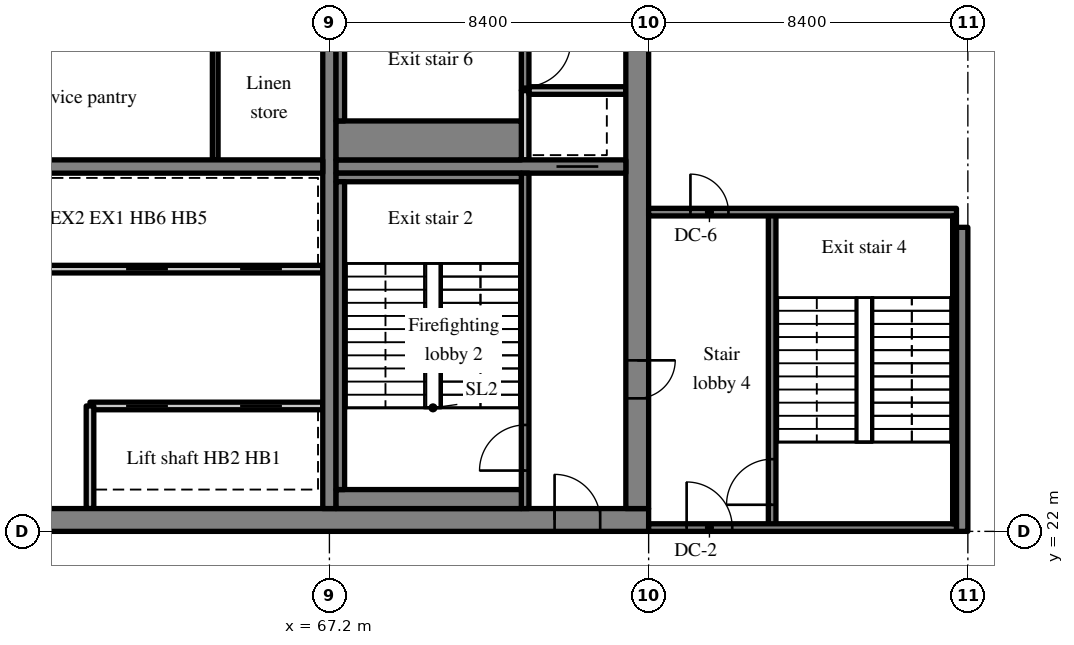
"""IFC4 building model, lengths in metres.
Left out: names, types, materials, properties, quantities, classifications, styles, units other than length and angle.
Written with IfcOpenShell. Run it as: python <this file> out.ifc"""

import sys

from ifc_helpers import new_model, si_unit, direction, frame, frame_2d, origin, place, context, subcontext, project, spatial, rectangle, extrude, source, transform, mapped, element, fill, save


model = new_model("IFC4")
c1 = context("Model", 3, precision=1e-05, world=origin(), true_north=direction((0.0, 1.0)))
c2 = subcontext(c1, "Body", "Model", "MODEL_VIEW")
j1 = project(units=[si_unit("LENGTHUNIT", "METRE"), si_unit("PLANEANGLEUNIT", "RADIAN")], contexts=[c1])
p1 = place(None, origin())
s1 = spatial("IfcSite", under=j1, at=p1, CompositionType="ELEMENT")
p2 = place(p1, origin())
s2 = spatial("IfcBuilding", under=s1, at=p2, CompositionType="ELEMENT")
p3 = place(p2, frame((0.0, 0.0, 221.8)))
s3 = spatial("IfcBuildingStorey", under=s2, at=p3, CompositionType="ELEMENT", Elevation=221.8)
m1 = source(origin(), c2, "Body", "SweptSolid", [
    extrude(rectangle(XDim=50.4, YDim=0.6, at=frame_2d((25.2, 0.0))), origin(), (0.0, 0.0, 1.0), 3.62),
])
p4 = place(p3, frame((25.2, 22.3, 0.0), z_axis=(0.0, 0.0, 1.0), x_axis=(1.0, 0.0, 0.0)))
e1 = element("IfcWall", 1, at=p4, inside=s3, PredefinedType="SHEAR", context=c2, shape_type="MappedRepresentation", body=[
    mapped(m1, transform((0.0, 0.0, 0.0), scale=1.0)),
])
m2 = source(origin(), c2, "Body", "SweptSolid", [
    extrude(rectangle(XDim=1.8, YDim=2.1, at=frame_2d((0.9, 1.05))), frame((0.0, 0.31, 0.0), z_axis=(0.0, -1.0, 0.0), x_axis=(1.0, 0.0, 0.0)), (0.0, 0.0, 1.0), 0.62),
])
p5 = place(p4, frame((15.9, 0.0, 0.0)))
e2 = element("IfcOpeningElement", 2, at=p5, cuts=e1, PredefinedType="OPENING", context=c2, shape_type="MappedRepresentation", body=[
    mapped(m2, transform((0.0, 0.0, 0.0), scale=1.0)),
])
m3 = source(origin(), c2, "Body", "SweptSolid", [
    extrude(rectangle(XDim=0.9, YDim=2.1, at=frame_2d((0.45, 1.05))), frame((0.0, 0.31, 0.0), z_axis=(0.0, -1.0, 0.0), x_axis=(1.0, 0.0, 0.0)), (0.0, 0.0, 1.0), 0.62),
])
p6 = place(p4, frame((9.687, 0.0, 0.0)))
e3 = element("IfcOpeningElement", 3, at=p6, cuts=e1, PredefinedType="OPENING", context=c2, shape_type="MappedRepresentation", body=[
    mapped(m3, transform((0.0, 0.0, 0.0), scale=1.0)),
])
p7 = place(p4, frame((21.513, 0.0, 0.0)))
e4 = element("IfcOpeningElement", 4, at=p7, cuts=e1, PredefinedType="OPENING", context=c2, shape_type="MappedRepresentation", body=[
    mapped(m3, transform((0.0, 0.0, 0.0), scale=1.0)),
])
p8 = place(p4, frame((32.7, 0.0, 0.0)))
e5 = element("IfcOpeningElement", 5, at=p8, cuts=e1, PredefinedType="OPENING", context=c2, shape_type="MappedRepresentation", body=[
    mapped(m2, transform((0.0, 0.0, 0.0), scale=1.0)),
])
m4 = source(origin(), c2, "Body", "SweptSolid", [
    extrude(rectangle(XDim=1.2, YDim=2.1, at=frame_2d((0.6, 1.05))), frame((0.0, 0.31, 0.0), z_axis=(0.0, -1.0, 0.0), x_axis=(1.0, 0.0, 0.0)), (0.0, 0.0, 1.0), 0.62),
])
p9 = place(p4, frame((6.488, 0.0, 0.0)))
e6 = element("IfcOpeningElement", 6, at=p9, cuts=e1, PredefinedType="OPENING", context=c2, shape_type="MappedRepresentation", body=[
    mapped(m4, transform((0.0, 0.0, 0.0), scale=1.0)),
])
p10 = place(p4, frame((47.925, 0.0, 0.0)))
e7 = element("IfcOpeningElement", 7, at=p10, cuts=e1, PredefinedType="OPENING", context=c2, shape_type="MappedRepresentation", body=[
    mapped(m4, transform((0.0, 0.0, 0.0), scale=1.0)),
])
m5 = source(origin(), c2, "Body", "SweptSolid", [
    extrude(rectangle(XDim=18.8, YDim=0.6, at=frame_2d((9.4, 0.0))), origin(), (0.0, 0.0, 1.0), 3.62),
])
p11 = place(p3, frame((75.3, 22.6, 0.0), z_axis=(0.0, 0.0, 1.0), x_axis=(0.0, 1.0, 0.0)))
e8 = element("IfcWall", 8, at=p11, inside=s3, PredefinedType="SHEAR", context=c2, shape_type="MappedRepresentation", body=[
    mapped(m5, transform((0.0, 0.0, 0.0), scale=1.0)),
])
m6 = source(origin(), c2, "Body", "SweptSolid", [
    extrude(rectangle(XDim=1.0, YDim=2.1, at=frame_2d((0.5, 1.05))), frame((0.0, 0.31, 0.0), z_axis=(0.0, -1.0, 0.0), x_axis=(1.0, 0.0, 0.0)), (0.0, 0.0, 1.0), 0.62),
])
p12 = place(p11, frame((2.9, 0.0, 0.0)))
e9 = element("IfcOpeningElement", 9, at=p12, cuts=e8, PredefinedType="OPENING", context=c2, shape_type="MappedRepresentation", body=[
    mapped(m6, transform((0.0, 0.0, 0.0), scale=1.0)),
])
p13 = place(p11, frame((12.8, 0.0, 0.0)))
e10 = element("IfcOpeningElement", 10, at=p13, cuts=e8, PredefinedType="OPENING", context=c2, shape_type="MappedRepresentation", body=[
    mapped(m4, transform((0.0, 0.0, 0.0), scale=1.0)),
])
m7 = source(origin(), c2, "Body", "SweptSolid", [
    extrude(rectangle(XDim=18.8, YDim=0.35, at=frame_2d((9.4, 0.0))), origin(), (0.0, 0.0, 1.0), 3.62),
])
p14 = place(p3, frame((67.2, 22.6, 0.0), z_axis=(0.0, 0.0, 1.0), x_axis=(0.0, 1.0, 0.0)))
e11 = element("IfcWall", 11, at=p14, inside=s3, PredefinedType="SHEAR", context=c2, shape_type="MappedRepresentation", body=[
    mapped(m7, transform((0.0, 0.0, 0.0), scale=1.0)),
])
m8 = source(origin(), c2, "Body", "SweptSolid", [
    extrude(rectangle(XDim=16.45, YDim=0.35, at=frame_2d((8.225, 0.0))), origin(), (0.0, 0.0, 1.0), 3.62),
])
p15 = place(p3, frame((50.575, 31.6, 0.0), z_axis=(0.0, 0.0, 1.0), x_axis=(1.0, 0.0, 0.0)))
e12 = element("IfcWall", 12, at=p15, inside=s3, PredefinedType="SHEAR", context=c2, shape_type="MappedRepresentation", body=[
    mapped(m8, transform((0.0, 0.0, 0.0), scale=1.0)),
])
m9 = source(origin(), c2, "Body", "SweptSolid", [
    extrude(rectangle(XDim=1.0, YDim=2.1, at=frame_2d((0.5, 1.05))), frame((0.0, 0.185, 0.0), z_axis=(0.0, -1.0, 0.0), x_axis=(1.0, 0.0, 0.0)), (0.0, 0.0, 1.0), 0.37),
])
p16 = place(p15, frame((0.613, 0.0, 0.0)))
e13 = element("IfcOpeningElement", 13, at=p16, cuts=e12, PredefinedType="OPENING", context=c2, shape_type="MappedRepresentation", body=[
    mapped(m9, transform((0.0, 0.0, 0.0), scale=1.0)),
])
m10 = source(origin(), c2, "Body", "SweptSolid", [
    extrude(rectangle(XDim=7.625, YDim=0.35, at=frame_2d((3.812, 0.0))), origin(), (0.0, 0.0, 1.0), 3.62),
])
p17 = place(p3, frame((67.375, 31.6, 0.0), z_axis=(0.0, 0.0, 1.0), x_axis=(1.0, 0.0, 0.0)))
e14 = element("IfcWall", 14, at=p17, inside=s3, PredefinedType="SHEAR", context=c2, shape_type="MappedRepresentation", body=[
    mapped(m10, transform((0.0, 0.0, 0.0), scale=1.0)),
])
m11 = source(origin(), c2, "Body", "SweptSolid", [
    extrude(rectangle(XDim=1.1, YDim=2.1, at=frame_2d((0.55, 1.05))), frame((0.0, 0.185, 0.0), z_axis=(0.0, -1.0, 0.0), x_axis=(1.0, 0.0, 0.0)), (0.0, 0.0, 1.0), 0.37),
])
p18 = place(p17, frame((5.8, 0.0, 0.0)))
e15 = element("IfcOpeningElement", 15, at=p18, cuts=e14, PredefinedType="OPENING", context=c2, shape_type="MappedRepresentation", body=[
    mapped(m11, transform((0.0, 0.0, 0.0), scale=1.0)),
])
m12 = source(origin(), c2, "Body", "SweptSolid", [
    extrude(rectangle(XDim=8.0, YDim=0.3, at=frame_2d((4.0, 0.0))), origin(), (0.0, 0.0, 1.0), 3.62),
])
p19 = place(p3, frame((83.85, 22.0, 0.0), z_axis=(0.0, 0.0, 1.0), x_axis=(0.0, 1.0, 0.0)))
e16 = element("IfcWall", 16, at=p19, inside=s3, PredefinedType="SHEAR", context=c2, shape_type="MappedRepresentation", body=[
    mapped(m12, transform((0.0, 0.0, 0.0), scale=1.0)),
])
m13 = source(origin(), c2, "Body", "SweptSolid", [
    extrude(rectangle(XDim=6.125, YDim=0.2, at=frame_2d((3.062, 0.0))), origin(), (0.0, 0.0, 1.0), 3.62),
])
p20 = place(p3, frame((67.025, 25.3, 0.0), z_axis=(0.0, 0.0, 1.0), x_axis=(-1.0, 0.0, 0.0)))
e17 = element("IfcWall", 17, at=p20, inside=s3, PredefinedType="SOLIDWALL", context=c2, shape_type="MappedRepresentation", body=[
    mapped(m13, transform((0.0, 0.0, 0.0), scale=1.0)),
])
m14 = source(origin(), c2, "Body", "SweptSolid", [
    extrude(rectangle(XDim=1.1, YDim=2.1, at=frame_2d((0.55, 1.05))), frame((0.0, 0.11, 0.0), z_axis=(0.0, -1.0, 0.0), x_axis=(1.0, 0.0, 0.0)), (0.0, 0.0, 1.0), 0.22),
])
p21 = place(p20, frame((1.075, 0.0, 0.0)))
e18 = element("IfcOpeningElement", 18, at=p21, cuts=e17, PredefinedType="OPENING", context=c2, shape_type="MappedRepresentation", body=[
    mapped(m14, transform((0.0, 0.0, 0.0), scale=1.0)),
])
p22 = place(p20, frame((4.075, 0.0, 0.0)))
e19 = element("IfcOpeningElement", 19, at=p22, cuts=e17, PredefinedType="OPENING", context=c2, shape_type="MappedRepresentation", body=[
    mapped(m14, transform((0.0, 0.0, 0.0), scale=1.0)),
])
m15 = source(origin(), c2, "Body", "SweptSolid", [
    extrude(rectangle(XDim=12.125, YDim=0.2, at=frame_2d((6.062, 0.0))), origin(), (0.0, 0.0, 1.0), 3.62),
])
p23 = place(p3, frame((67.025, 28.9, 0.0), z_axis=(0.0, 0.0, 1.0), x_axis=(-1.0, 0.0, 0.0)))
e20 = element("IfcWall", 20, at=p23, inside=s3, PredefinedType="SOLIDWALL", context=c2, shape_type="MappedRepresentation", body=[
    mapped(m15, transform((0.0, 0.0, 0.0), scale=1.0)),
])
p24 = place(p23, frame((1.075, 0.0, 0.0)))
e21 = element("IfcOpeningElement", 21, at=p24, cuts=e20, PredefinedType="OPENING", context=c2, shape_type="MappedRepresentation", body=[
    mapped(m14, transform((0.0, 0.0, 0.0), scale=1.0)),
])
p25 = place(p23, frame((4.075, 0.0, 0.0)))
e22 = element("IfcOpeningElement", 22, at=p25, cuts=e20, PredefinedType="OPENING", context=c2, shape_type="MappedRepresentation", body=[
    mapped(m14, transform((0.0, 0.0, 0.0), scale=1.0)),
])
m16 = source(origin(), c2, "Body", "SweptSolid", [
    extrude(rectangle(XDim=2.7, YDim=0.2, at=frame_2d((1.35, 0.0))), origin(), (0.0, 0.0, 1.0), 3.62),
])
p26 = place(p3, frame((60.9, 22.6, 0.0), z_axis=(0.0, 0.0, 1.0), x_axis=(0.0, 1.0, 0.0)))
e23 = element("IfcWall", 23, at=p26, inside=s3, PredefinedType="SOLIDWALL", context=c2, shape_type="MappedRepresentation", body=[
    mapped(m16, transform((0.0, 0.0, 0.0), scale=1.0)),
])
m17 = source(origin(), c2, "Body", "SweptSolid", [
    extrude(rectangle(XDim=3.225, YDim=0.15, at=frame_2d((1.613, 0.0))), origin(), (0.0, 0.0, 1.0), 3.62),
])
p27 = place(p3, frame((64.195, 31.775, 0.0), z_axis=(0.0, 0.0, 1.0), x_axis=(0.0, 1.0, 0.0)))
e24 = element("IfcWall", 24, at=p27, inside=s3, PredefinedType="PARTITIONING", context=c2, shape_type="MappedRepresentation", body=[
    mapped(m17, transform((0.0, 0.0, 0.0), scale=1.0)),
])
m18 = source(origin(), c2, "Body", "SweptSolid", [
    extrude(rectangle(XDim=8.825, YDim=0.2, at=frame_2d((4.413, 0.0))), origin(), (0.0, 0.0, 1.0), 3.62),
])
p28 = place(p3, frame((72.35, 22.6, 0.0), z_axis=(0.0, 0.0, 1.0), x_axis=(0.0, 1.0, 0.0)))
e25 = element("IfcWall", 25, at=p28, inside=s3, PredefinedType="SOLIDWALL", context=c2, shape_type="MappedRepresentation", body=[
    mapped(m18, transform((0.0, 0.0, 0.0), scale=1.0)),
])
m19 = source(origin(), c2, "Body", "SweptSolid", [
    extrude(rectangle(XDim=1.2, YDim=2.1, at=frame_2d((0.6, 1.05))), frame((0.0, 0.11, 0.0), z_axis=(0.0, -1.0, 0.0), x_axis=(1.0, 0.0, 0.0)), (0.0, 0.0, 1.0), 0.22),
])
p29 = place(p28, frame((1.0, 0.0, 0.0)))
e26 = element("IfcOpeningElement", 26, at=p29, cuts=e25, PredefinedType="OPENING", context=c2, shape_type="MappedRepresentation", body=[
    mapped(m19, transform((0.0, 0.0, 0.0), scale=1.0)),
])
m20 = source(origin(), c2, "Body", "SweptSolid", [
    extrude(rectangle(XDim=1.825, YDim=0.2, at=frame_2d((0.913, 0.0))), origin(), (0.0, 0.0, 1.0), 3.62),
])
p30 = place(p3, frame((72.35, 31.775, 0.0), z_axis=(0.0, 0.0, 1.0), x_axis=(0.0, 1.0, 0.0)))
e27 = element("IfcWall", 27, at=p30, inside=s3, PredefinedType="SOLIDWALL", context=c2, shape_type="MappedRepresentation", body=[
    mapped(m20, transform((0.0, 0.0, 0.0), scale=1.0)),
])
m21 = source(origin(), c2, "Body", "SweptSolid", [
    extrude(rectangle(XDim=2.55, YDim=0.2, at=frame_2d((1.275, 0.0))), origin(), (0.0, 0.0, 1.0), 3.62),
])
p31 = place(p3, frame((72.45, 33.6, 0.0), z_axis=(0.0, 0.0, 1.0), x_axis=(1.0, 0.0, 0.0)))
e28 = element("IfcWall", 28, at=p31, inside=s3, PredefinedType="SOLIDWALL", context=c2, shape_type="MappedRepresentation", body=[
    mapped(m21, transform((0.0, 0.0, 0.0), scale=1.0)),
])
m22 = source(origin(), c2, "Body", "SweptSolid", [
    extrude(rectangle(XDim=7.8, YDim=0.2, at=frame_2d((3.9, 0.0))), origin(), (0.0, 0.0, 1.0), 3.62),
])
p32 = place(p3, frame((72.35, 33.6, 0.0), z_axis=(0.0, 0.0, 1.0), x_axis=(0.0, 1.0, 0.0)))
e29 = element("IfcWall", 29, at=p32, inside=s3, PredefinedType="SOLIDWALL", context=c2, shape_type="MappedRepresentation", body=[
    mapped(m22, transform((0.0, 0.0, 0.0), scale=1.0)),
])
p33 = place(p32, frame((0.1, 0.0, 0.0)))
e30 = element("IfcOpeningElement", 30, at=p33, cuts=e29, PredefinedType="OPENING", context=c2, shape_type="MappedRepresentation", body=[
    mapped(m19, transform((0.0, 0.0, 0.0), scale=1.0)),
])
m23 = source(origin(), c2, "Body", "SweptSolid", [
    extrude(rectangle(XDim=8.3, YDim=0.2, at=frame_2d((4.15, 0.0))), origin(), (0.0, 0.0, 1.0), 3.62),
])
p34 = place(p3, frame((78.85, 22.1, 0.0), z_axis=(0.0, 0.0, 1.0), x_axis=(0.0, 1.0, 0.0)))
e31 = element("IfcWall", 31, at=p34, inside=s3, PredefinedType="SOLIDWALL", context=c2, shape_type="MappedRepresentation", body=[
    mapped(m23, transform((0.0, 0.0, 0.0), scale=1.0)),
])
p35 = place(p34, frame((0.6, 0.0, 0.0)))
e32 = element("IfcOpeningElement", 32, at=p35, cuts=e31, PredefinedType="OPENING", context=c2, shape_type="MappedRepresentation", body=[
    mapped(m19, transform((0.0, 0.0, 0.0), scale=1.0)),
])
m24 = source(origin(), c2, "Body", "SweptSolid", [
    extrude(rectangle(XDim=8.1, YDim=0.2, at=frame_2d((4.05, 0.0))), origin(), (0.0, 0.0, 1.0), 3.62),
])
p36 = place(p3, frame((83.7, 22.1, 0.0), z_axis=(0.0, 0.0, 1.0), x_axis=(-1.0, 0.0, 0.0)))
e33 = element("IfcWall", 33, at=p36, inside=s3, PredefinedType="SOLIDWALL", context=c2, shape_type="MappedRepresentation", body=[
    mapped(m24, transform((0.0, 0.0, 0.0), scale=1.0)),
])
p37 = place(p36, frame((5.9, 0.0, 0.0)))
e34 = element("IfcOpeningElement", 34, at=p37, cuts=e33, PredefinedType="OPENING", context=c2, shape_type="MappedRepresentation", body=[
    mapped(m19, transform((0.0, 0.0, 0.0), scale=1.0)),
])
p38 = place(p3, frame((83.7, 30.4, 0.0), z_axis=(0.0, 0.0, 1.0), x_axis=(-1.0, 0.0, 0.0)))
e35 = element("IfcWall", 35, at=p38, inside=s3, PredefinedType="SOLIDWALL", context=c2, shape_type="MappedRepresentation", body=[
    mapped(m24, transform((0.0, 0.0, 0.0), scale=1.0)),
])
m25 = source(origin(), c2, "Body", "SweptSolid", [
    extrude(rectangle(XDim=1.0, YDim=2.1, at=frame_2d((0.5, 1.05))), frame((0.0, 0.11, 0.0), z_axis=(0.0, -1.0, 0.0), x_axis=(1.0, 0.0, 0.0)), (0.0, 0.0, 1.0), 0.22),
])
p39 = place(p38, frame((6.0, 0.0, 0.0)))
e36 = element("IfcOpeningElement", 36, at=p39, cuts=e35, PredefinedType="OPENING", context=c2, shape_type="MappedRepresentation", body=[
    mapped(m25, transform((0.0, 0.0, 0.0), scale=1.0)),
])
m26 = source(origin(), c2, "Body", "SweptSolid", [
    extrude(rectangle(XDim=4.875, YDim=0.5, at=frame_2d((2.438, 0.0))), origin(), (0.0, 0.0, 1.0), 3.62),
])
p40 = place(p3, frame((67.375, 22.85, 0.0), z_axis=(0.0, 0.0, 1.0), x_axis=(1.0, 0.0, 0.0)))
e37 = element("IfcWall", 37, at=p40, inside=s3, PredefinedType="SOLIDWALL", context=c2, shape_type="MappedRepresentation", body=[
    mapped(m26, transform((0.0, 0.0, 0.0), scale=1.0)),
])
m27 = source(origin(), c2, "Body", "SweptSolid", [
    extrude(rectangle(XDim=4.875, YDim=0.225, at=frame_2d((2.438, 0.0))), origin(), (0.0, 0.0, 1.0), 3.62),
])
p41 = place(p3, frame((67.375, 31.312, 0.0), z_axis=(0.0, 0.0, 1.0), x_axis=(1.0, 0.0, 0.0)))
e38 = element("IfcWall", 38, at=p41, inside=s3, PredefinedType="SOLIDWALL", context=c2, shape_type="MappedRepresentation", body=[
    mapped(m27, transform((0.0, 0.0, 0.0), scale=1.0)),
])
m28 = source(origin(), c2, "Body", "SweptSolid", [
    extrude(rectangle(XDim=8.1, YDim=0.225, at=frame_2d((4.05, 0.0))), origin(), (0.0, 0.0, 1.0), 3.62),
])
p42 = place(p3, frame((67.487, 23.1, 0.0), z_axis=(0.0, 0.0, 1.0), x_axis=(0.0, 1.0, 0.0)))
e39 = element("IfcWall", 39, at=p42, inside=s3, PredefinedType="SOLIDWALL", context=c2, shape_type="MappedRepresentation", body=[
    mapped(m28, transform((0.0, 0.0, 0.0), scale=1.0)),
])
m29 = source(origin(), c2, "Body", "SweptSolid", [
    extrude(rectangle(XDim=4.875, YDim=1.025, at=frame_2d((2.438, 0.0))), origin(), (0.0, 0.0, 1.0), 3.62),
])
p43 = place(p3, frame((67.375, 32.287, 0.0), z_axis=(0.0, 0.0, 1.0), x_axis=(1.0, 0.0, 0.0)))
e40 = element("IfcWall", 40, at=p43, inside=s3, PredefinedType="SOLIDWALL", context=c2, shape_type="MappedRepresentation", body=[
    mapped(m29, transform((0.0, 0.0, 0.0), scale=1.0)),
])
p44 = place(p3, frame((67.487, 32.8, 0.0), z_axis=(0.0, 0.0, 1.0), x_axis=(0.0, 1.0, 0.0)))
e41 = element("IfcWall", 41, at=p44, inside=s3, PredefinedType="SOLIDWALL", context=c2, shape_type="MappedRepresentation", body=[
    mapped(m28, transform((0.0, 0.0, 0.0), scale=1.0)),
])
m30 = source(origin(), c2, "Body", "SweptSolid", [
    extrude(rectangle(XDim=8.1, YDim=0.1, at=frame_2d((4.05, 0.0))), origin(), (0.0, 0.0, 1.0), 3.62),
])
p45 = place(p3, frame((83.65, 22.2, 0.0), z_axis=(0.0, 0.0, 1.0), x_axis=(0.0, 1.0, 0.0)))
e42 = element("IfcWall", 42, at=p45, inside=s3, PredefinedType="SOLIDWALL", context=c2, shape_type="MappedRepresentation", body=[
    mapped(m30, transform((0.0, 0.0, 0.0), scale=1.0)),
])
m31 = source(origin(), c2, "Body", "SweptSolid", [
    extrude(rectangle(XDim=1.1, YDim=2.1, at=frame_2d((0.55, 1.05))), frame((0.0, 0.025, 0.0), z_axis=(0.0, -1.0, 0.0), x_axis=(1.0, 0.0, 0.0)), (0.0, 0.0, 1.0), 0.05),
])
p46 = place(p21, origin())
e43 = element("IfcDoor", 43, at=p46, inside=s3, OperationType="SLIDING_TO_RIGHT", PredefinedType="DOOR", context=c2, shape_type="MappedRepresentation", body=[
    mapped(m31, transform((0.0, 0.0, 0.0), scale=1.0)),
])
fill(e18, e43)
p47 = place(p22, origin())
e44 = element("IfcDoor", 44, at=p47, inside=s3, OperationType="SLIDING_TO_LEFT", PredefinedType="DOOR", context=c2, shape_type="MappedRepresentation", body=[
    mapped(m31, transform((0.0, 0.0, 0.0), scale=1.0)),
])
fill(e19, e44)
p48 = place(p24, origin())
e45 = element("IfcDoor", 45, at=p48, inside=s3, OperationType="SLIDING_TO_RIGHT", PredefinedType="DOOR", context=c2, shape_type="MappedRepresentation", body=[
    mapped(m31, transform((0.0, 0.0, 0.0), scale=1.0)),
])
fill(e21, e45)
p49 = place(p25, origin())
e46 = element("IfcDoor", 46, at=p49, inside=s3, OperationType="SLIDING_TO_LEFT", PredefinedType="DOOR", context=c2, shape_type="MappedRepresentation", body=[
    mapped(m31, transform((0.0, 0.0, 0.0), scale=1.0)),
])
fill(e22, e46)
m32 = source(origin(), c2, "Body", "SweptSolid", [
    extrude(rectangle(XDim=1.2, YDim=2.1, at=frame_2d((0.6, 1.05))), frame((0.0, 0.025, 0.0), z_axis=(0.0, -1.0, 0.0), x_axis=(1.0, 0.0, 0.0)), (0.0, 0.0, 1.0), 0.05),
])
p50 = place(p29, origin())
e47 = element("IfcDoor", 47, at=p50, inside=s3, OperationType="SINGLE_SWING_LEFT", PredefinedType="DOOR", context=c2, shape_type="MappedRepresentation", body=[
    mapped(m32, transform((0.0, 0.0, 0.0), scale=1.0)),
])
fill(e26, e47)
m33 = source(origin(), c2, "Body", "SweptSolid", [
    extrude(rectangle(XDim=1.2, YDim=2.1, at=frame_2d((0.6, 1.05))), frame((0.0, 0.225, 0.0), z_axis=(0.0, -1.0, 0.0), x_axis=(1.0, 0.0, 0.0)), (0.0, 0.0, 1.0), 0.05),
])
p51 = place(p10, origin())
e48 = element("IfcDoor", 48, at=p51, inside=s3, OperationType="SINGLE_SWING_LEFT", PredefinedType="DOOR", context=c2, shape_type="MappedRepresentation", body=[
    mapped(m33, transform((0.0, 0.0, 0.0), scale=1.0)),
])
fill(e7, e48)
p52 = place(p18, origin())
e49 = element("IfcDoor", 49, at=p52, inside=s3, OperationType="SLIDING_TO_LEFT", PredefinedType="DOOR", context=c2, shape_type="MappedRepresentation", body=[
    mapped(m31, transform((0.0, 0.0, 0.0), scale=1.0)),
])
fill(e15, e49)
m34 = source(origin(), c2, "Body", "SweptSolid", [
    extrude(rectangle(XDim=1.0, YDim=2.1, at=frame_2d((0.5, 1.05))), frame((0.0, 0.025, 0.0), z_axis=(0.0, -1.0, 0.0), x_axis=(1.0, 0.0, 0.0)), (0.0, 0.0, 1.0), 0.05),
])
p53 = place(p12, origin())
e50 = element("IfcDoor", 50, at=p53, inside=s3, OperationType="SINGLE_SWING_RIGHT", PredefinedType="DOOR", context=c2, shape_type="MappedRepresentation", body=[
    mapped(m34, transform((0.0, 0.0, 0.0), scale=1.0)),
])
fill(e9, e50)
p54 = place(p33, origin())
e51 = element("IfcDoor", 51, at=p54, inside=s3, OperationType="SINGLE_SWING_RIGHT", PredefinedType="DOOR", context=c2, shape_type="MappedRepresentation", body=[
    mapped(m32, transform((0.0, 0.0, 0.0), scale=1.0)),
])
fill(e30, e51)
p55 = place(p35, origin())
e52 = element("IfcDoor", 52, at=p55, inside=s3, OperationType="SINGLE_SWING_LEFT", PredefinedType="DOOR", context=c2, shape_type="MappedRepresentation", body=[
    mapped(m32, transform((0.0, 0.0, 0.0), scale=1.0)),
])
fill(e32, e52)
p56 = place(p37, origin())
e53 = element("IfcDoor", 53, at=p56, inside=s3, OperationType="SINGLE_SWING_RIGHT", PredefinedType="DOOR", context=c2, shape_type="MappedRepresentation", body=[
    mapped(m32, transform((0.0, 0.0, 0.0), scale=1.0)),
])
fill(e34, e53)
p57 = place(p39, origin())
e54 = element("IfcDoor", 54, at=p57, inside=s3, OperationType="SINGLE_SWING_RIGHT", PredefinedType="DOOR", context=c2, shape_type="MappedRepresentation", body=[
    mapped(m34, transform((0.0, 0.0, 0.0), scale=1.0)),
])
fill(e36, e54)
save(model, sys.argv[1])
